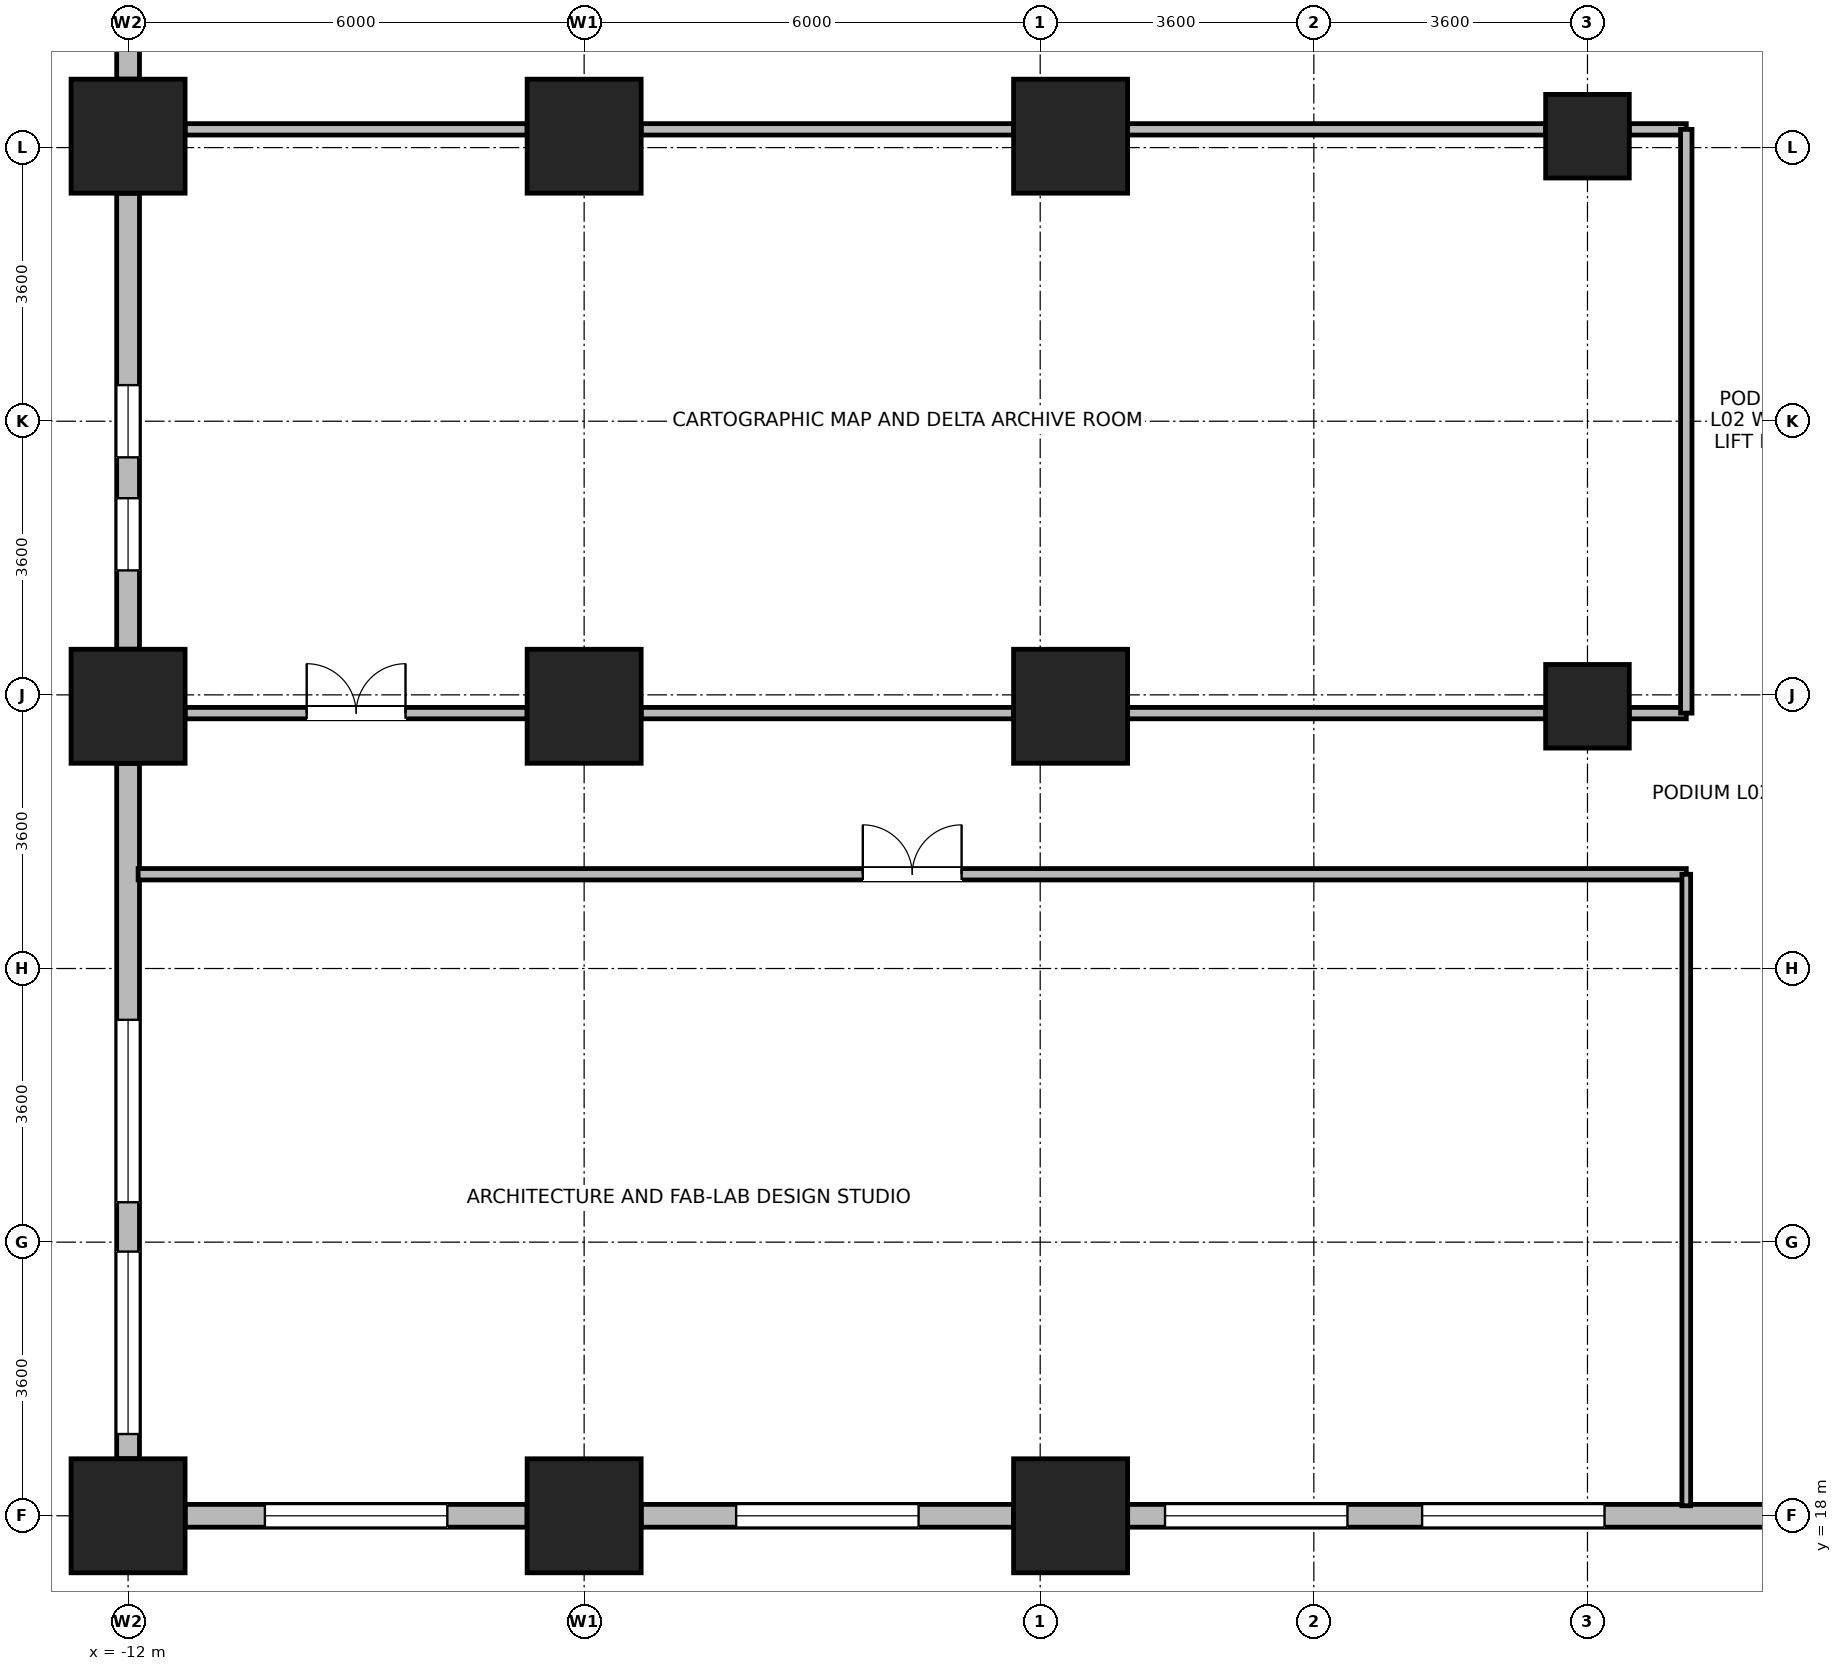
"""IFC4 building model, lengths in metres.
Left out: names, types, materials, properties, quantities, classifications, styles, units other than length and angle.
Written with IfcOpenShell. Run it as: python <this file> out.ifc"""

import sys

from ifc_helpers import new_model, si_unit, direction, frame, frame_2d, origin, origin_2d, place, context, subcontext, project, spatial, rectangle, circle, extrude, source, transform, mapped, element, fill, save


model = new_model("IFC4")
c1 = context("Model", 3, precision=1e-05, world=origin(), true_north=direction((0.0, 1.0)))
c2 = subcontext(c1, "Body", "Model", "MODEL_VIEW")
j1 = project(units=[si_unit("LENGTHUNIT", "METRE"), si_unit("PLANEANGLEUNIT", "RADIAN")], contexts=[c1])
p1 = place(None, origin())
s1 = spatial("IfcSite", under=j1, at=p1, CompositionType="ELEMENT")
p2 = place(p1, origin())
s2 = spatial("IfcBuilding", under=s1, at=p2, CompositionType="ELEMENT")
p3 = place(p2, frame((0.0, 0.0, 10.2)))
s3 = spatial("IfcBuildingStorey", under=s2, at=p3, CompositionType="ELEMENT", Elevation=10.2)
m1 = source(origin(), c2, "Body", "SweptSolid", [
    extrude(circle(Radius=0.55, at=origin_2d()), origin(), (0.0, 0.0, 1.0), 4.8),
])
for number, where, z_axis, x_axis in (
    (1, (7.2, 28.65, 0.0), (0.0, 0.0, 1.0), (1.0, 0.0, 0.0)),
    (2, (7.2, 36.15, 0.0), (0.0, 0.0, 1.0), (1.0, 0.0, 0.0)),
):
    element("IfcColumn", number, at=place(p3, frame(where, z_axis=z_axis, x_axis=x_axis)), inside=s3, PredefinedType="COLUMN", context=c2, shape_type="MappedRepresentation", body=[
        mapped(m1, transform((0.0, 0.0, 0.0), x_axis=(1.0, 0.0, 0.0), y_axis=(0.0, 1.0, 0.0), z_axis=(0.0, 0.0, 1.0), scale=1.0)),
    ])
m2 = source(origin(), c2, "Body", "SweptSolid", [
    extrude(rectangle(XDim=1.5, YDim=1.5, at=origin_2d()), origin(), (0.0, 0.0, 1.0), 4.8),
])
for number, where, z_axis, x_axis in (
    (3, (0.4, 18.0, 0.0), (0.0, 0.0, 1.0), (1.0, 0.0, 0.0)),
    (4, (0.4, 28.65, 0.0), (0.0, 0.0, 1.0), (1.0, 0.0, 0.0)),
    (5, (0.4, 36.15, 0.0), (0.0, 0.0, 1.0), (1.0, 0.0, 0.0)),
    (6, (-12.0, 18.0, 0.0), (0.0, 0.0, 1.0), (1.0, 0.0, 0.0)),
    (7, (-12.0, 28.65, 0.0), (0.0, 0.0, 1.0), (1.0, 0.0, 0.0)),
    (8, (-12.0, 36.15, 0.0), (0.0, 0.0, 1.0), (1.0, 0.0, 0.0)),
    (9, (-6.0, 18.0, 0.0), (0.0, 0.0, 1.0), (1.0, 0.0, 0.0)),
    (10, (-6.0, 28.65, 0.0), (0.0, 0.0, 1.0), (1.0, 0.0, 0.0)),
    (11, (-6.0, 36.15, 0.0), (0.0, 0.0, 1.0), (1.0, 0.0, 0.0)),
):
    element("IfcColumn", number, at=place(p3, frame(where, z_axis=z_axis, x_axis=x_axis)), inside=s3, PredefinedType="COLUMN", context=c2, shape_type="MappedRepresentation", body=[
        mapped(m2, transform((0.0, 0.0, 0.0), x_axis=(1.0, 0.0, 0.0), y_axis=(0.0, 1.0, 0.0), z_axis=(0.0, 0.0, 1.0), scale=1.0)),
    ])
p4 = place(p3, frame((-12.0, 36.901, 0.0), z_axis=(0.0, 0.0, 1.0), x_axis=(0.0, 1.0, 0.0)))
e12 = element("IfcWall", 12, at=p4, inside=s3, PredefinedType="STANDARD", context=c2, shape_type="SweptSolid", body=[
    extrude(rectangle(XDim=7.198, YDim=0.3, at=frame_2d((3.599, 0.0))), origin(), (0.0, 0.0, 1.0), 3.9),
])
p5 = place(p4, frame((4.198, 0.0, 0.9)))
e13 = element("IfcOpeningElement", 13, at=p5, cuts=e12, PredefinedType="OPENING", context=c2, shape_type="SweptSolid", body=[
    extrude(rectangle(XDim=2.4, YDim=2.5, at=frame_2d((1.2, 1.25))), frame((0.0, 0.16, 0.0), z_axis=(0.0, -1.0, 0.0), x_axis=(1.0, 0.0, 0.0)), (0.0, 0.0, 1.0), 0.32),
])
p6 = place(p4, frame((2.548, 0.0, 0.9)))
e14 = element("IfcOpeningElement", 14, at=p6, cuts=e12, PredefinedType="OPENING", context=c2, shape_type="SweptSolid", body=[
    extrude(rectangle(XDim=0.95, YDim=1.75, at=frame_2d((0.475, 0.875))), frame((0.0, 0.16, 0.0), z_axis=(0.0, -1.0, 0.0), x_axis=(1.0, 0.0, 0.0)), (0.0, 0.0, 1.0), 0.32),
])
p7 = place(p3, frame((-12.0, 29.401, 0.0), z_axis=(0.0, 0.0, 1.0), x_axis=(0.0, 1.0, 0.0)))
e15 = element("IfcWall", 15, at=p7, inside=s3, PredefinedType="STANDARD", context=c2, shape_type="SweptSolid", body=[
    extrude(rectangle(XDim=5.998, YDim=0.3, at=frame_2d((2.999, 0.0))), origin(), (0.0, 0.0, 1.0), 3.9),
])
p8 = place(p7, frame((2.524, 0.0, 0.9)))
e16 = element("IfcOpeningElement", 16, at=p8, cuts=e15, PredefinedType="OPENING", context=c2, shape_type="SweptSolid", body=[
    extrude(rectangle(XDim=0.95, YDim=1.75, at=frame_2d((0.475, 0.875))), frame((0.0, 0.16, 0.0), z_axis=(0.0, -1.0, 0.0), x_axis=(1.0, 0.0, 0.0)), (0.0, 0.0, 1.0), 0.32),
])
p9 = place(p7, frame((1.037, 0.0, 0.9)))
e17 = element("IfcOpeningElement", 17, at=p9, cuts=e15, PredefinedType="OPENING", context=c2, shape_type="SweptSolid", body=[
    extrude(rectangle(XDim=0.95, YDim=1.75, at=frame_2d((0.475, 0.875))), frame((0.0, 0.16, 0.0), z_axis=(0.0, -1.0, 0.0), x_axis=(1.0, 0.0, 0.0)), (0.0, 0.0, 1.0), 0.32),
])
p10 = place(p3, frame((-12.0, 18.751, 0.0), z_axis=(0.0, 0.0, 1.0), x_axis=(0.0, 1.0, 0.0)))
e18 = element("IfcWall", 18, at=p10, inside=s3, PredefinedType="STANDARD", context=c2, shape_type="SweptSolid", body=[
    extrude(rectangle(XDim=9.148, YDim=0.3, at=frame_2d((4.574, 0.0))), origin(), (0.0, 0.0, 1.0), 3.9),
])
p11 = place(p10, frame((0.325, 0.0, 0.9)))
e19 = element("IfcOpeningElement", 19, at=p11, cuts=e18, PredefinedType="OPENING", context=c2, shape_type="SweptSolid", body=[
    extrude(rectangle(XDim=2.4, YDim=2.5, at=frame_2d((1.2, 1.25))), frame((0.0, 0.16, 0.0), z_axis=(0.0, -1.0, 0.0), x_axis=(1.0, 0.0, 0.0)), (0.0, 0.0, 1.0), 0.32),
])
p12 = place(p10, frame((3.374, 0.0, 0.9)))
e20 = element("IfcOpeningElement", 20, at=p12, cuts=e18, PredefinedType="OPENING", context=c2, shape_type="SweptSolid", body=[
    extrude(rectangle(XDim=2.4, YDim=2.5, at=frame_2d((1.2, 1.25))), frame((0.0, 0.16, 0.0), z_axis=(0.0, -1.0, 0.0), x_axis=(1.0, 0.0, 0.0)), (0.0, 0.0, 1.0), 0.32),
])
p13 = place(p3, frame((-6.751, 18.0, 0.0), z_axis=(0.0, 0.0, 1.0), x_axis=(-1.0, 0.0, 0.0)))
e21 = element("IfcWall", 21, at=p13, inside=s3, PredefinedType="STANDARD", context=c2, shape_type="SweptSolid", body=[
    extrude(rectangle(XDim=4.498, YDim=0.3, at=frame_2d((2.249, 0.0))), origin(), (0.0, 0.0, 1.0), 3.8),
])
p14 = place(p13, frame((1.049, 0.0, 0.9)))
e22 = element("IfcOpeningElement", 22, at=p14, cuts=e21, PredefinedType="OPENING", context=c2, shape_type="SweptSolid", body=[
    extrude(rectangle(XDim=2.4, YDim=2.5, at=frame_2d((1.2, 1.25))), frame((0.0, 0.16, 0.0), z_axis=(0.0, -1.0, 0.0), x_axis=(1.0, 0.0, 0.0)), (0.0, 0.0, 1.0), 0.32),
])
p15 = place(p3, frame((-0.351, 18.0, 0.0), z_axis=(0.0, 0.0, 1.0), x_axis=(-1.0, 0.0, 0.0)))
e23 = element("IfcWall", 23, at=p15, inside=s3, PredefinedType="STANDARD", context=c2, shape_type="SweptSolid", body=[
    extrude(rectangle(XDim=4.898, YDim=0.3, at=frame_2d((2.449, 0.0))), origin(), (0.0, 0.0, 1.0), 3.8),
])
p16 = place(p15, frame((1.249, 0.0, 0.9)))
e24 = element("IfcOpeningElement", 24, at=p16, cuts=e23, PredefinedType="OPENING", context=c2, shape_type="SweptSolid", body=[
    extrude(rectangle(XDim=2.4, YDim=2.5, at=frame_2d((1.2, 1.25))), frame((0.0, 0.16, 0.0), z_axis=(0.0, -1.0, 0.0), x_axis=(1.0, 0.0, 0.0)), (0.0, 0.0, 1.0), 0.32),
])
p17 = place(p3, frame((21.445, 18.0, 0.0), z_axis=(0.0, 0.0, 1.0), x_axis=(-1.0, 0.0, 0.0)))
e25 = element("IfcWall", 25, at=p17, inside=s3, PredefinedType="STANDARD", context=c2, shape_type="SweptSolid", body=[
    extrude(rectangle(XDim=20.294, YDim=0.3, at=frame_2d((10.147, 0.0))), origin(), (0.0, 0.0, 1.0), 4.5),
])
p18 = place(p17, frame((0.491, 0.0, 0.9)))
e26 = element("IfcOpeningElement", 26, at=p18, cuts=e25, PredefinedType="OPENING", context=c2, shape_type="SweptSolid", body=[
    extrude(rectangle(XDim=2.4, YDim=2.5, at=frame_2d((1.2, 1.25))), frame((0.0, 0.16, 0.0), z_axis=(0.0, -1.0, 0.0), x_axis=(1.0, 0.0, 0.0)), (0.0, 0.0, 1.0), 0.32),
])
p19 = place(p17, frame((3.874, 0.0, 0.9)))
e27 = element("IfcOpeningElement", 27, at=p19, cuts=e25, PredefinedType="OPENING", context=c2, shape_type="SweptSolid", body=[
    extrude(rectangle(XDim=2.4, YDim=2.5, at=frame_2d((1.2, 1.25))), frame((0.0, 0.16, 0.0), z_axis=(0.0, -1.0, 0.0), x_axis=(1.0, 0.0, 0.0)), (0.0, 0.0, 1.0), 0.32),
])
p20 = place(p17, frame((7.256, 0.0, 0.9)))
e28 = element("IfcOpeningElement", 28, at=p20, cuts=e25, PredefinedType="OPENING", context=c2, shape_type="SweptSolid", body=[
    extrude(rectangle(XDim=2.4, YDim=2.5, at=frame_2d((1.2, 1.25))), frame((0.0, 0.16, 0.0), z_axis=(0.0, -1.0, 0.0), x_axis=(1.0, 0.0, 0.0)), (0.0, 0.0, 1.0), 0.32),
])
p21 = place(p17, frame((14.021, 0.0, 0.9)))
e29 = element("IfcOpeningElement", 29, at=p21, cuts=e25, PredefinedType="OPENING", context=c2, shape_type="SweptSolid", body=[
    extrude(rectangle(XDim=2.4, YDim=2.5, at=frame_2d((1.2, 1.25))), frame((0.0, 0.16, 0.0), z_axis=(0.0, -1.0, 0.0), x_axis=(1.0, 0.0, 0.0)), (0.0, 0.0, 1.0), 0.32),
])
p22 = place(p17, frame((17.403, 0.0, 0.9)))
e30 = element("IfcOpeningElement", 30, at=p22, cuts=e25, PredefinedType="OPENING", context=c2, shape_type="SweptSolid", body=[
    extrude(rectangle(XDim=2.4, YDim=2.5, at=frame_2d((1.2, 1.25))), frame((0.0, 0.16, 0.0), z_axis=(0.0, -1.0, 0.0), x_axis=(1.0, 0.0, 0.0)), (0.0, 0.0, 1.0), 0.32),
])
p23 = place(p3, frame((-11.868, 26.44, 0.0), z_axis=(0.0, 0.0, 1.0), x_axis=(1.0, 0.0, 0.0)))
e31 = element("IfcWall", 31, at=p23, inside=s3, PredefinedType="PARTITIONING", context=c2, shape_type="SweptSolid", body=[
    extrude(rectangle(XDim=20.368, YDim=0.15, at=frame_2d((10.184, 0.0))), origin(), (0.0, 0.0, 1.0), 4.5),
])
p24 = place(p23, frame((9.534, 0.0, 0.0)))
e32 = element("IfcOpeningElement", 32, at=p24, cuts=e31, PredefinedType="OPENING", context=c2, shape_type="SweptSolid", body=[
    extrude(rectangle(XDim=1.3, YDim=2.12, at=frame_2d((0.65, 1.06))), frame((0.0, 0.085, 0.0), z_axis=(0.0, -1.0, 0.0), x_axis=(1.0, 0.0, 0.0)), (0.0, 0.0, 1.0), 0.17),
])
p25 = place(p3, frame((-11.25, 28.56, 0.0), z_axis=(0.0, 0.0, 1.0), x_axis=(1.0, 0.0, 0.0)))
e33 = element("IfcWall", 33, at=p25, inside=s3, PredefinedType="PARTITIONING", context=c2, shape_type="SweptSolid", body=[
    extrude(rectangle(XDim=4.5, YDim=0.15, at=frame_2d((2.25, 0.0))), origin(), (0.0, 0.0, 1.0), 3.8),
])
p26 = place(p25, frame((1.6, 0.0, 0.0)))
e34 = element("IfcOpeningElement", 34, at=p26, cuts=e33, PredefinedType="OPENING", context=c2, shape_type="SweptSolid", body=[
    extrude(rectangle(XDim=1.3, YDim=2.12, at=frame_2d((0.65, 1.06))), frame((0.0, 0.085, 0.0), z_axis=(0.0, -1.0, 0.0), x_axis=(1.0, 0.0, 0.0)), (0.0, 0.0, 1.0), 0.17),
])
p27 = place(p3, frame((-5.25, 28.56, 0.0), z_axis=(0.0, 0.0, 1.0), x_axis=(1.0, 0.0, 0.0)))
e35 = element("IfcWall", 35, at=p27, inside=s3, PredefinedType="PARTITIONING", context=c2, shape_type="SweptSolid", body=[
    extrude(rectangle(XDim=4.9, YDim=0.15, at=frame_2d((2.45, 0.0))), origin(), (0.0, 0.0, 1.0), 3.8),
])
p28 = place(p3, frame((1.15, 28.56, 0.0), z_axis=(0.0, 0.0, 1.0), x_axis=(1.0, 0.0, 0.0)))
e36 = element("IfcWall", 36, at=p28, inside=s3, PredefinedType="PARTITIONING", context=c2, shape_type="SweptSolid", body=[
    extrude(rectangle(XDim=5.5, YDim=0.15, at=frame_2d((2.75, 0.0))), origin(), (0.0, 0.0, 1.0), 3.8),
])
p29 = place(p3, frame((7.75, 28.56, 0.0), z_axis=(0.0, 0.0, 1.0), x_axis=(1.0, 0.0, 0.0)))
e37 = element("IfcWall", 37, at=p29, inside=s3, PredefinedType="PARTITIONING", context=c2, shape_type="SweptSolid", body=[
    extrude(rectangle(XDim=0.75, YDim=0.15, at=frame_2d((0.375, 0.0))), origin(), (0.0, 0.0, 1.0), 3.8),
])
p30 = place(p3, frame((-11.25, 36.24, 0.0), z_axis=(0.0, 0.0, 1.0), x_axis=(1.0, 0.0, 0.0)))
e38 = element("IfcWall", 38, at=p30, inside=s3, PredefinedType="PARTITIONING", context=c2, shape_type="SweptSolid", body=[
    extrude(rectangle(XDim=4.5, YDim=0.15, at=frame_2d((2.25, 0.0))), origin(), (0.0, 0.0, 1.0), 3.8),
])
p31 = place(p3, frame((-5.25, 36.24, 0.0), z_axis=(0.0, 0.0, 1.0), x_axis=(1.0, 0.0, 0.0)))
e39 = element("IfcWall", 39, at=p31, inside=s3, PredefinedType="PARTITIONING", context=c2, shape_type="SweptSolid", body=[
    extrude(rectangle(XDim=4.9, YDim=0.15, at=frame_2d((2.45, 0.0))), origin(), (0.0, 0.0, 1.0), 3.8),
])
p32 = place(p3, frame((1.15, 36.24, 0.0), z_axis=(0.0, 0.0, 1.0), x_axis=(1.0, 0.0, 0.0)))
e40 = element("IfcWall", 40, at=p32, inside=s3, PredefinedType="PARTITIONING", context=c2, shape_type="SweptSolid", body=[
    extrude(rectangle(XDim=5.5, YDim=0.15, at=frame_2d((2.75, 0.0))), origin(), (0.0, 0.0, 1.0), 3.8),
])
p33 = place(p3, frame((7.75, 36.24, 0.0), z_axis=(0.0, 0.0, 1.0), x_axis=(1.0, 0.0, 0.0)))
e41 = element("IfcWall", 41, at=p33, inside=s3, PredefinedType="PARTITIONING", context=c2, shape_type="SweptSolid", body=[
    extrude(rectangle(XDim=0.75, YDim=0.15, at=frame_2d((0.375, 0.0))), origin(), (0.0, 0.0, 1.0), 3.8),
])
p34 = place(p3, frame((8.5, 28.56, 0.0), z_axis=(0.0, 0.0, 1.0), x_axis=(0.0, 1.0, 0.0)))
e42 = element("IfcWall", 42, at=p34, inside=s3, PredefinedType="PARTITIONING", context=c2, shape_type="SweptSolid", body=[
    extrude(rectangle(XDim=7.68, YDim=0.15, at=frame_2d((3.84, 0.0))), origin(), (0.0, 0.0, 1.0), 4.5),
])
p35 = place(p3, frame((8.5, 18.132, 0.0), z_axis=(0.0, 0.0, 1.0), x_axis=(0.0, 1.0, 0.0)))
e43 = element("IfcWall", 43, at=p35, inside=s3, PredefinedType="PARTITIONING", context=c2, shape_type="SweptSolid", body=[
    extrude(rectangle(XDim=8.308, YDim=0.115, at=frame_2d((4.154, 0.0))), origin(), (0.0, 0.0, 1.0), 4.5),
])
p36 = place(p8, origin())
e44 = element("IfcWindow", 44, at=p36, inside=s3, PartitioningType="SINGLE_PANEL", PredefinedType="WINDOW", context=c2, shape_type="SweptSolid", body=[
    extrude(rectangle(XDim=0.95, YDim=1.75, at=frame_2d((0.475, 0.875))), frame((0.0, 0.03, 0.0), z_axis=(0.0, -1.0, 0.0), x_axis=(1.0, 0.0, 0.0)), (0.0, 0.0, 1.0), 0.06),
])
fill(e16, e44)
p37 = place(p9, origin())
e45 = element("IfcWindow", 45, at=p37, inside=s3, PartitioningType="SINGLE_PANEL", PredefinedType="WINDOW", context=c2, shape_type="SweptSolid", body=[
    extrude(rectangle(XDim=0.95, YDim=1.75, at=frame_2d((0.475, 0.875))), frame((0.0, 0.03, 0.0), z_axis=(0.0, -1.0, 0.0), x_axis=(1.0, 0.0, 0.0)), (0.0, 0.0, 1.0), 0.06),
])
fill(e17, e45)
p38 = place(p11, origin())
e46 = element("IfcWindow", 46, at=p38, inside=s3, PartitioningType="SINGLE_PANEL", PredefinedType="WINDOW", context=c2, shape_type="SweptSolid", body=[
    extrude(rectangle(XDim=2.4, YDim=2.5, at=frame_2d((1.2, 1.25))), frame((0.0, 0.03, 0.0), z_axis=(0.0, -1.0, 0.0), x_axis=(1.0, 0.0, 0.0)), (0.0, 0.0, 1.0), 0.06),
])
fill(e19, e46)
p39 = place(p12, origin())
e47 = element("IfcWindow", 47, at=p39, inside=s3, PartitioningType="SINGLE_PANEL", PredefinedType="WINDOW", context=c2, shape_type="SweptSolid", body=[
    extrude(rectangle(XDim=2.4, YDim=2.5, at=frame_2d((1.2, 1.25))), frame((0.0, 0.03, 0.0), z_axis=(0.0, -1.0, 0.0), x_axis=(1.0, 0.0, 0.0)), (0.0, 0.0, 1.0), 0.06),
])
fill(e20, e47)
p40 = place(p14, origin())
e48 = element("IfcWindow", 48, at=p40, inside=s3, PartitioningType="SINGLE_PANEL", PredefinedType="WINDOW", context=c2, shape_type="SweptSolid", body=[
    extrude(rectangle(XDim=2.4, YDim=2.5, at=frame_2d((1.2, 1.25))), frame((0.0, 0.03, 0.0), z_axis=(0.0, -1.0, 0.0), x_axis=(1.0, 0.0, 0.0)), (0.0, 0.0, 1.0), 0.06),
])
fill(e22, e48)
p41 = place(p16, origin())
e49 = element("IfcWindow", 49, at=p41, inside=s3, PartitioningType="SINGLE_PANEL", PredefinedType="WINDOW", context=c2, shape_type="SweptSolid", body=[
    extrude(rectangle(XDim=2.4, YDim=2.5, at=frame_2d((1.2, 1.25))), frame((0.0, 0.03, 0.0), z_axis=(0.0, -1.0, 0.0), x_axis=(1.0, 0.0, 0.0)), (0.0, 0.0, 1.0), 0.06),
])
fill(e24, e49)
p42 = place(p21, origin())
e50 = element("IfcWindow", 50, at=p42, inside=s3, PartitioningType="SINGLE_PANEL", PredefinedType="WINDOW", context=c2, shape_type="SweptSolid", body=[
    extrude(rectangle(XDim=2.4, YDim=2.5, at=frame_2d((1.2, 1.25))), frame((0.0, 0.03, 0.0), z_axis=(0.0, -1.0, 0.0), x_axis=(1.0, 0.0, 0.0)), (0.0, 0.0, 1.0), 0.06),
])
fill(e29, e50)
p43 = place(p22, origin())
e51 = element("IfcWindow", 51, at=p43, inside=s3, PartitioningType="SINGLE_PANEL", PredefinedType="WINDOW", context=c2, shape_type="SweptSolid", body=[
    extrude(rectangle(XDim=2.4, YDim=2.5, at=frame_2d((1.2, 1.25))), frame((0.0, 0.03, 0.0), z_axis=(0.0, -1.0, 0.0), x_axis=(1.0, 0.0, 0.0)), (0.0, 0.0, 1.0), 0.06),
])
fill(e30, e51)
p44 = place(p24, origin())
e52 = element("IfcDoor", 52, at=p44, inside=s3, OperationType="DOUBLE_DOOR_SINGLE_SWING", PredefinedType="DOOR", context=c2, shape_type="SweptSolid", body=[
    extrude(rectangle(XDim=1.3, YDim=2.12, at=frame_2d((0.65, 1.06))), frame((0.0, 0.025, 0.0), z_axis=(0.0, -1.0, 0.0), x_axis=(1.0, 0.0, 0.0)), (0.0, 0.0, 1.0), 0.05),
])
fill(e32, e52)
p45 = place(p26, origin())
e53 = element("IfcDoor", 53, at=p45, inside=s3, OperationType="DOUBLE_DOOR_SINGLE_SWING", PredefinedType="DOOR", context=c2, shape_type="SweptSolid", body=[
    extrude(rectangle(XDim=1.3, YDim=2.12, at=frame_2d((0.65, 1.06))), frame((0.0, 0.025, 0.0), z_axis=(0.0, -1.0, 0.0), x_axis=(1.0, 0.0, 0.0)), (0.0, 0.0, 1.0), 0.05),
])
fill(e34, e53)
save(model, sys.argv[1])
